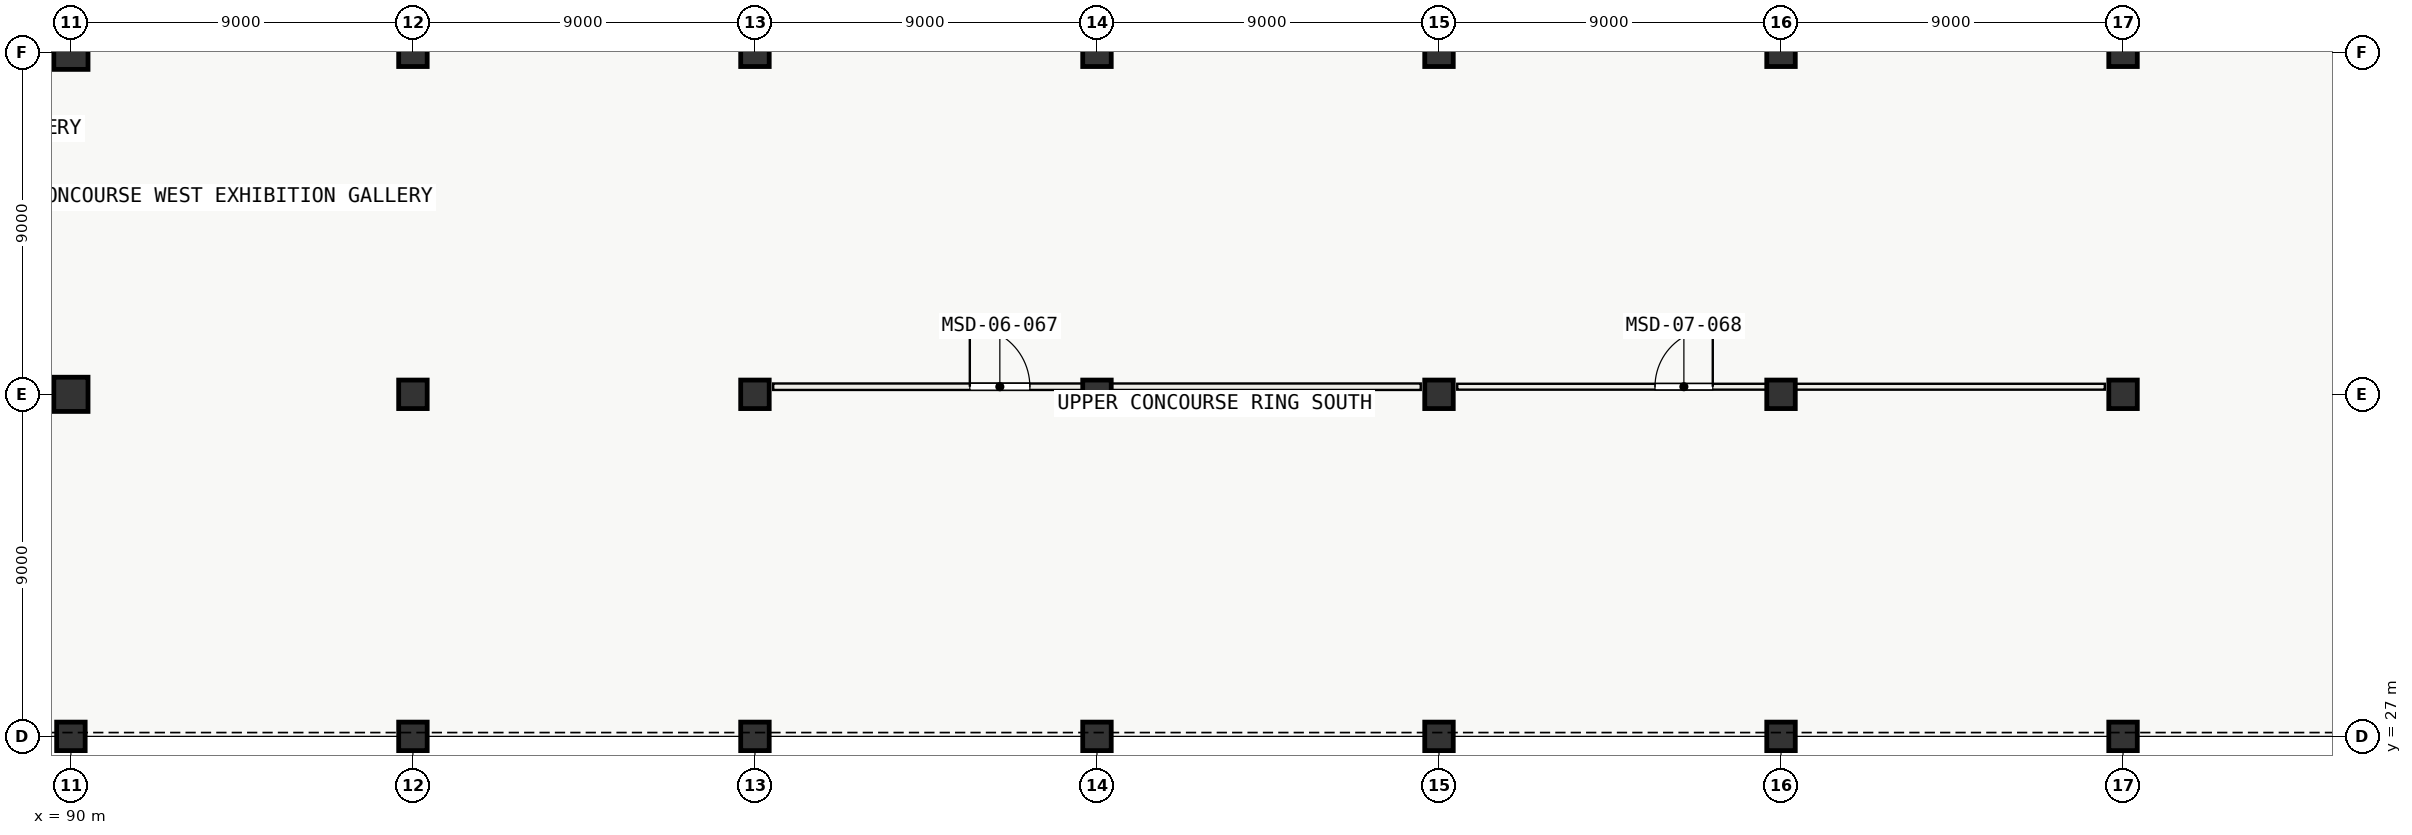
"""IFC4 building model, lengths in metres.
Left out: names, types, materials, properties, quantities, classifications, styles, units other than length and angle.
Written with IfcOpenShell. Run it as: python <this file> out.ifc"""

import sys

from ifc_helpers import new_model, si_unit, direction, frame, frame_2d, origin, origin_2d, place, context, subcontext, project, spatial, rectangle, extrude, element, fill, save


model = new_model("IFC4")
c1 = context("Model", 3, precision=1e-05, world=origin(), true_north=direction((0.0, 1.0)))
c2 = subcontext(c1, "Body", "Model", "MODEL_VIEW")
j1 = project(units=[si_unit("LENGTHUNIT", "METRE"), si_unit("PLANEANGLEUNIT", "RADIAN")], contexts=[c1])
p1 = place(None, origin())
s1 = spatial("IfcSite", under=j1, at=p1, CompositionType="ELEMENT")
p2 = place(p1, origin())
s2 = spatial("IfcBuilding", under=s1, at=p2, CompositionType="ELEMENT")
p3 = place(p2, frame((0.0, 0.0, 6.0)))
s3 = spatial("IfcBuildingStorey", under=s2, at=p3, CompositionType="ELEMENT", Elevation=6.0)
p4 = place(p3, frame((90.0, 27.0, 0.0), z_axis=(0.0, 0.0, 1.0), x_axis=(1.0, 0.0, 0.0)))
e1 = element("IfcColumn", 1, at=p4, inside=s3, PredefinedType="COLUMN", context=c2, shape_type="SweptSolid", body=[
    extrude(rectangle(XDim=0.75, YDim=0.75, at=origin_2d()), origin(), (0.0, 0.0, 1.0), 6.0),
])
for number, where, z_axis, x_axis in (
    (2, (90.0, 36.0, 0.0), (0.0, 0.0, 1.0), (1.0, 0.0, 0.0)),
    (3, (90.0, 45.0, 0.0), (0.0, 0.0, 1.0), (1.0, 0.0, 0.0)),
):
    element("IfcColumn", number, at=place(p3, frame(where, z_axis=z_axis, x_axis=x_axis)), inside=s3, PredefinedType="COLUMN", context=c2, shape_type="SweptSolid", body=[
        extrude(rectangle(XDim=0.9, YDim=0.9, at=origin_2d()), origin(), (0.0, 0.0, 1.0), 6.0),
    ])
for number, where, z_axis, x_axis in (
    (4, (99.0, 27.0, 0.0), (0.0, 0.0, 1.0), (1.0, 0.0, 0.0)),
    (5, (99.0, 36.0, 0.0), (0.0, 0.0, 1.0), (1.0, 0.0, 0.0)),
    (6, (99.0, 45.0, 0.0), (0.0, 0.0, 1.0), (1.0, 0.0, 0.0)),
    (7, (108.0, 27.0, 0.0), (0.0, 0.0, 1.0), (1.0, 0.0, 0.0)),
    (8, (108.0, 36.0, 0.0), (0.0, 0.0, 1.0), (1.0, 0.0, 0.0)),
    (9, (108.0, 45.0, 0.0), (0.0, 0.0, 1.0), (1.0, 0.0, 0.0)),
    (10, (117.0, 27.0, 0.0), (0.0, 0.0, 1.0), (1.0, 0.0, 0.0)),
    (11, (117.0, 36.0, 0.0), (0.0, 0.0, 1.0), (1.0, 0.0, 0.0)),
    (12, (117.0, 45.0, 0.0), (0.0, 0.0, 1.0), (1.0, 0.0, 0.0)),
    (13, (126.0, 27.0, 0.0), (0.0, 0.0, 1.0), (1.0, 0.0, 0.0)),
    (14, (126.0, 36.0, 0.0), (0.0, 0.0, 1.0), (1.0, 0.0, 0.0)),
    (15, (126.0, 45.0, 0.0), (0.0, 0.0, 1.0), (1.0, 0.0, 0.0)),
    (16, (135.0, 27.0, 0.0), (0.0, 0.0, 1.0), (1.0, 0.0, 0.0)),
    (17, (135.0, 36.0, 0.0), (0.0, 0.0, 1.0), (1.0, 0.0, 0.0)),
    (18, (135.0, 45.0, 0.0), (0.0, 0.0, 1.0), (1.0, 0.0, 0.0)),
    (19, (144.0, 27.0, 0.0), (0.0, 0.0, 1.0), (1.0, 0.0, 0.0)),
    (20, (144.0, 36.0, 0.0), (0.0, 0.0, 1.0), (1.0, 0.0, 0.0)),
    (21, (144.0, 45.0, 0.0), (0.0, 0.0, 1.0), (1.0, 0.0, 0.0)),
):
    element("IfcColumn", number, at=place(p3, frame(where, z_axis=z_axis, x_axis=x_axis)), inside=s3, PredefinedType="COLUMN", context=c2, shape_type="SweptSolid", body=[
        extrude(rectangle(XDim=0.75, YDim=0.75, at=origin_2d()), origin(), (0.0, 0.0, 1.0), 6.0),
    ])
p5 = place(p3, frame((81.6, 36.0, 0.0), z_axis=(0.0, 0.0, 1.0), x_axis=(1.0, 0.0, 0.0)))
e22 = element("IfcWall", 22, at=p5, inside=s3, PredefinedType="SOLIDWALL", context=c2, shape_type="SweptSolid", body=[
    extrude(rectangle(XDim=7.951, YDim=0.34, at=frame_2d((3.976, 0.0))), origin(), (0.0, 0.0, 1.0), 4.66),
])
p6 = place(p5, frame((3.226, 0.0, 1.0)))
e23 = element("IfcOpeningElement", 23, at=p6, cuts=e22, PredefinedType="OPENING", context=c2, shape_type="SweptSolid", body=[
    extrude(rectangle(XDim=1.5, YDim=1.3, at=frame_2d((0.75, 0.65))), frame((0.0, 0.18, 0.0), z_axis=(0.0, -1.0, 0.0), x_axis=(1.0, 0.0, 0.0)), (0.0, 0.0, 1.0), 0.36),
])
p7 = place(p3, frame((108.48, 36.2, 0.0), z_axis=(0.0, 0.0, 1.0), x_axis=(1.0, 0.0, 0.0)))
e24 = element("IfcWall", 24, at=p7, inside=s3, PredefinedType="PARTITIONING", context=c2, shape_type="SweptSolid", body=[
    extrude(rectangle(XDim=17.04, YDim=0.17, at=frame_2d((8.52, 0.0))), origin(), (0.0, 0.0, 1.0), 4.64),
])
p8 = place(p7, frame((5.174, 0.0, 0.0)))
e25 = element("IfcOpeningElement", 25, at=p8, cuts=e24, PredefinedType="OPENING", context=c2, shape_type="SweptSolid", body=[
    extrude(rectangle(XDim=1.58, YDim=2.25, at=frame_2d((0.79, 1.125))), frame((0.0, 0.095, 0.0), z_axis=(0.0, -1.0, 0.0), x_axis=(1.0, 0.0, 0.0)), (0.0, 0.0, 1.0), 0.19),
])
p9 = place(p3, frame((126.48, 36.2, 0.0), z_axis=(0.0, 0.0, 1.0), x_axis=(1.0, 0.0, 0.0)))
e26 = element("IfcWall", 26, at=p9, inside=s3, PredefinedType="PARTITIONING", context=c2, shape_type="SweptSolid", body=[
    extrude(rectangle(XDim=17.04, YDim=0.155, at=frame_2d((8.52, 0.0))), origin(), (0.0, 0.0, 1.0), 4.64),
])
p10 = place(p9, frame((5.204, 0.0, 0.0)))
e27 = element("IfcOpeningElement", 27, at=p10, cuts=e26, PredefinedType="OPENING", context=c2, shape_type="SweptSolid", body=[
    extrude(rectangle(XDim=1.52, YDim=2.22, at=frame_2d((0.76, 1.11))), frame((0.0, 0.087, 0.0), z_axis=(0.0, -1.0, 0.0), x_axis=(1.0, 0.0, 0.0)), (0.0, 0.0, 1.0), 0.175),
])
p11 = place(p8, origin())
e28 = element("IfcDoor", 28, at=p11, inside=s3, OperationType="SINGLE_SWING_LEFT", PredefinedType="DOOR", context=c2, shape_type="SweptSolid", body=[
    extrude(rectangle(XDim=1.58, YDim=2.25, at=frame_2d((0.79, 1.125))), frame((0.0, 0.025, 0.0), z_axis=(0.0, -1.0, 0.0), x_axis=(1.0, 0.0, 0.0)), (0.0, 0.0, 1.0), 0.05),
])
fill(e25, e28)
p12 = place(p10, origin())
e29 = element("IfcDoor", 29, at=p12, inside=s3, OperationType="SINGLE_SWING_RIGHT", PredefinedType="DOOR", context=c2, shape_type="SweptSolid", body=[
    extrude(rectangle(XDim=1.52, YDim=2.22, at=frame_2d((0.76, 1.11))), frame((0.0, 0.025, 0.0), z_axis=(0.0, -1.0, 0.0), x_axis=(1.0, 0.0, 0.0)), (0.0, 0.0, 1.0), 0.05),
])
fill(e27, e29)
save(model, sys.argv[1])
